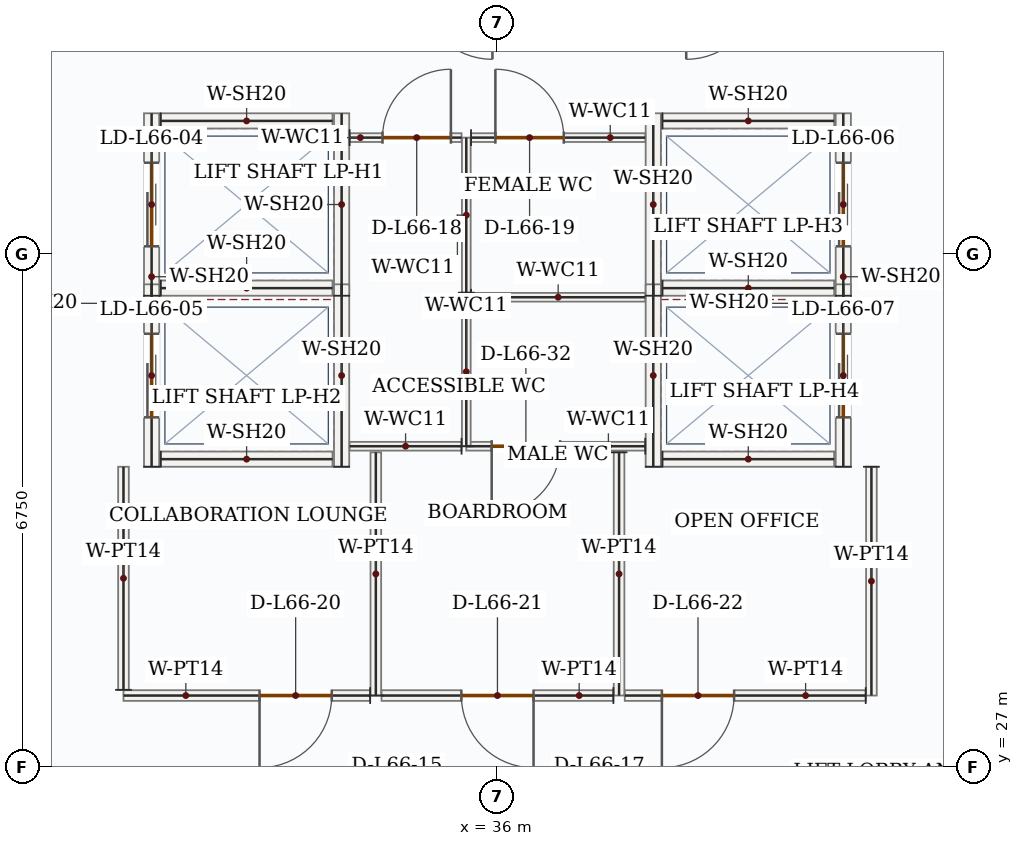
"""IFC4 building model, lengths in metres.
Left out: names, types, materials, properties, quantities, classifications, styles, units other than length and angle.
Written with IfcOpenShell. Run it as: python <this file> out.ifc"""

import sys

from ifc_helpers import new_model, si_unit, direction, frame, frame_2d, origin, place, context, subcontext, project, spatial, rectangle, extrude, source, transform, mapped, element, fill, save


model = new_model("IFC4")
c1 = context("Model", 3, precision=1e-05, world=origin(), true_north=direction((0.0, 1.0)))
c2 = subcontext(c1, "Body", "Model", "MODEL_VIEW")
j1 = project(units=[si_unit("LENGTHUNIT", "METRE"), si_unit("PLANEANGLEUNIT", "RADIAN")], contexts=[c1])
p1 = place(None, origin())
s1 = spatial("IfcSite", under=j1, at=p1, CompositionType="ELEMENT")
p2 = place(p1, origin())
s2 = spatial("IfcBuilding", under=s1, at=p2, CompositionType="ELEMENT")
p3 = place(p2, frame((0.0, 0.0, 276.6)))
s3 = spatial("IfcBuildingStorey", under=s2, at=p3, CompositionType="ELEMENT", Elevation=276.6)
p4 = place(p3, frame((31.45, 33.2, 0.0), z_axis=(0.0, 0.0, 1.0), x_axis=(0.0, 1.0, 0.0)))
e1 = element("IfcWall", 1, at=p4, inside=s3, PredefinedType="SOLIDWALL", context=c2, shape_type="SweptSolid", body=[
    extrude(rectangle(XDim=2.4, YDim=0.2, at=frame_2d((1.2, 0.0))), origin(), (0.0, 0.0, 1.0), 3.5),
])
p5 = place(p4, frame((0.65, 0.0, 0.0)))
e2 = element("IfcOpeningElement", 2, at=p5, cuts=e1, PredefinedType="OPENING", context=c2, shape_type="SweptSolid", body=[
    extrude(rectangle(XDim=1.1, YDim=2.15, at=frame_2d((0.55, 1.075))), frame((0.0, 0.11, 0.0), z_axis=(0.0, -1.0, 0.0), x_axis=(1.0, 0.0, 0.0)), (0.0, 0.0, 1.0), 0.22),
])
m1 = source(origin(), c2, "Body", "SweptSolid", [
    extrude(rectangle(XDim=2.4, YDim=0.2, at=frame_2d((1.2, 0.0))), origin(), (0.0, 0.0, 1.0), 3.5),
])
p6 = place(p3, frame((33.95, 33.2, 0.0), z_axis=(0.0, 0.0, 1.0), x_axis=(0.0, 1.0, 0.0)))
e3 = element("IfcWall", 3, at=p6, inside=s3, PredefinedType="SOLIDWALL", context=c2, shape_type="MappedRepresentation", body=[
    mapped(m1, transform((0.0, 0.0, 0.0), x_axis=(1.0, 0.0, 0.0), y_axis=(0.0, 1.0, 0.0), z_axis=(0.0, 0.0, 1.0), scale=1.0)),
])
m2 = source(origin(), c2, "Body", "SweptSolid", [
    extrude(rectangle(XDim=2.26, YDim=0.2, at=frame_2d((1.13, 0.0))), origin(), (0.0, 0.0, 1.0), 3.5),
])
for number, where, z_axis, x_axis in (
    (4, (31.57, 33.3, 0.0), (0.0, 0.0, 1.0), (1.0, 0.0, 0.0)),
    (5, (31.57, 35.5, 0.0), (0.0, 0.0, 1.0), (1.0, 0.0, 0.0)),
):
    element("IfcWall", number, at=place(p3, frame(where, z_axis=z_axis, x_axis=x_axis)), inside=s3, PredefinedType="SOLIDWALL", context=c2, shape_type="MappedRepresentation", body=[
        mapped(m2, transform((0.0, 0.0, 0.0), x_axis=(1.0, 0.0, 0.0), y_axis=(0.0, 1.0, 0.0), z_axis=(0.0, 0.0, 1.0), scale=1.0)),
    ])
p7 = place(p3, frame((31.45, 30.95, 0.0), z_axis=(0.0, 0.0, 1.0), x_axis=(0.0, 1.0, 0.0)))
e6 = element("IfcWall", 6, at=p7, inside=s3, PredefinedType="SOLIDWALL", context=c2, shape_type="SweptSolid", body=[
    extrude(rectangle(XDim=2.4, YDim=0.2, at=frame_2d((1.2, 0.0))), origin(), (0.0, 0.0, 1.0), 3.5),
])
p8 = place(p7, frame((0.65, 0.0, 0.0)))
e7 = element("IfcOpeningElement", 7, at=p8, cuts=e6, PredefinedType="OPENING", context=c2, shape_type="SweptSolid", body=[
    extrude(rectangle(XDim=1.1, YDim=2.15, at=frame_2d((0.55, 1.075))), frame((0.0, 0.11, 0.0), z_axis=(0.0, -1.0, 0.0), x_axis=(1.0, 0.0, 0.0)), (0.0, 0.0, 1.0), 0.22),
])
p9 = place(p3, frame((33.95, 30.95, 0.0), z_axis=(0.0, 0.0, 1.0), x_axis=(0.0, 1.0, 0.0)))
e8 = element("IfcWall", 8, at=p9, inside=s3, PredefinedType="SOLIDWALL", context=c2, shape_type="MappedRepresentation", body=[
    mapped(m1, transform((0.0, 0.0, 0.0), x_axis=(1.0, 0.0, 0.0), y_axis=(0.0, 1.0, 0.0), z_axis=(0.0, 0.0, 1.0), scale=1.0)),
])
p10 = place(p3, frame((31.57, 31.05, 0.0), z_axis=(0.0, 0.0, 1.0), x_axis=(1.0, 0.0, 0.0)))
e9 = element("IfcWall", 9, at=p10, inside=s3, PredefinedType="SOLIDWALL", context=c2, shape_type="MappedRepresentation", body=[
    mapped(m2, transform((0.0, 0.0, 0.0), x_axis=(1.0, 0.0, 0.0), y_axis=(0.0, 1.0, 0.0), z_axis=(0.0, 0.0, 1.0), scale=1.0)),
])
p11 = place(p3, frame((38.05, 33.2, 0.0), z_axis=(0.0, 0.0, 1.0), x_axis=(0.0, 1.0, 0.0)))
e10 = element("IfcWall", 10, at=p11, inside=s3, PredefinedType="SOLIDWALL", context=c2, shape_type="MappedRepresentation", body=[
    mapped(m1, transform((0.0, 0.0, 0.0), x_axis=(1.0, 0.0, 0.0), y_axis=(0.0, 1.0, 0.0), z_axis=(0.0, 0.0, 1.0), scale=1.0)),
])
p12 = place(p3, frame((40.55, 33.2, 0.0), z_axis=(0.0, 0.0, 1.0), x_axis=(0.0, 1.0, 0.0)))
e11 = element("IfcWall", 11, at=p12, inside=s3, PredefinedType="SOLIDWALL", context=c2, shape_type="SweptSolid", body=[
    extrude(rectangle(XDim=2.4, YDim=0.2, at=frame_2d((1.2, 0.0))), origin(), (0.0, 0.0, 1.0), 3.5),
])
p13 = place(p12, frame((0.65, 0.0, 0.0)))
e12 = element("IfcOpeningElement", 12, at=p13, cuts=e11, PredefinedType="OPENING", context=c2, shape_type="SweptSolid", body=[
    extrude(rectangle(XDim=1.1, YDim=2.15, at=frame_2d((0.55, 1.075))), frame((0.0, 0.11, 0.0), z_axis=(0.0, -1.0, 0.0), x_axis=(1.0, 0.0, 0.0)), (0.0, 0.0, 1.0), 0.22),
])
for number, where, z_axis, x_axis in (
    (13, (38.17, 33.3, 0.0), (0.0, 0.0, 1.0), (1.0, 0.0, 0.0)),
    (14, (38.17, 35.5, 0.0), (0.0, 0.0, 1.0), (1.0, 0.0, 0.0)),
):
    element("IfcWall", number, at=place(p3, frame(where, z_axis=z_axis, x_axis=x_axis)), inside=s3, PredefinedType="SOLIDWALL", context=c2, shape_type="MappedRepresentation", body=[
        mapped(m2, transform((0.0, 0.0, 0.0), x_axis=(1.0, 0.0, 0.0), y_axis=(0.0, 1.0, 0.0), z_axis=(0.0, 0.0, 1.0), scale=1.0)),
    ])
p14 = place(p3, frame((38.05, 30.95, 0.0), z_axis=(0.0, 0.0, 1.0), x_axis=(0.0, 1.0, 0.0)))
e15 = element("IfcWall", 15, at=p14, inside=s3, PredefinedType="SOLIDWALL", context=c2, shape_type="MappedRepresentation", body=[
    mapped(m1, transform((0.0, 0.0, 0.0), x_axis=(1.0, 0.0, 0.0), y_axis=(0.0, 1.0, 0.0), z_axis=(0.0, 0.0, 1.0), scale=1.0)),
])
p15 = place(p3, frame((40.55, 30.95, 0.0), z_axis=(0.0, 0.0, 1.0), x_axis=(0.0, 1.0, 0.0)))
e16 = element("IfcWall", 16, at=p15, inside=s3, PredefinedType="SOLIDWALL", context=c2, shape_type="SweptSolid", body=[
    extrude(rectangle(XDim=2.4, YDim=0.2, at=frame_2d((1.2, 0.0))), origin(), (0.0, 0.0, 1.0), 3.5),
])
p16 = place(p15, frame((0.65, 0.0, 0.0)))
e17 = element("IfcOpeningElement", 17, at=p16, cuts=e16, PredefinedType="OPENING", context=c2, shape_type="SweptSolid", body=[
    extrude(rectangle(XDim=1.1, YDim=2.15, at=frame_2d((0.55, 1.075))), frame((0.0, 0.11, 0.0), z_axis=(0.0, -1.0, 0.0), x_axis=(1.0, 0.0, 0.0)), (0.0, 0.0, 1.0), 0.22),
])
p17 = place(p3, frame((38.17, 31.05, 0.0), z_axis=(0.0, 0.0, 1.0), x_axis=(1.0, 0.0, 0.0)))
e18 = element("IfcWall", 18, at=p17, inside=s3, PredefinedType="SOLIDWALL", context=c2, shape_type="MappedRepresentation", body=[
    mapped(m2, transform((0.0, 0.0, 0.0), x_axis=(1.0, 0.0, 0.0), y_axis=(0.0, 1.0, 0.0), z_axis=(0.0, 0.0, 1.0), scale=1.0)),
])
p18 = place(p3, frame((37.945, 31.22, 0.0), z_axis=(0.0, 0.0, 1.0), x_axis=(-1.0, 0.0, 0.0)))
e19 = element("IfcWall", 19, at=p18, inside=s3, PredefinedType="PARTITIONING", context=c2, shape_type="SweptSolid", body=[
    extrude(rectangle(XDim=2.355, YDim=0.115, at=frame_2d((1.177, 0.0))), origin(), (0.0, 0.0, 1.0), 3.5),
])
p19 = place(p18, frame((1.121, 0.0, 0.0)))
e20 = element("IfcOpeningElement", 20, at=p19, cuts=e19, PredefinedType="OPENING", context=c2, shape_type="SweptSolid", body=[
    extrude(rectangle(XDim=0.9, YDim=2.1, at=frame_2d((0.45, 1.05))), frame((0.0, 0.067, 0.0), z_axis=(0.0, -1.0, 0.0), x_axis=(1.0, 0.0, 0.0)), (0.0, 0.0, 1.0), 0.135),
])
m3 = source(origin(), c2, "Body", "SweptSolid", [
    extrude(rectangle(XDim=1.96, YDim=0.115, at=frame_2d((0.98, 0.0))), origin(), (0.0, 0.0, 1.0), 3.5),
])
p20 = place(p3, frame((35.59, 31.22, 0.0), z_axis=(0.0, 0.0, 1.0), x_axis=(0.0, 1.0, 0.0)))
e21 = element("IfcWall", 21, at=p20, inside=s3, PredefinedType="PARTITIONING", context=c2, shape_type="MappedRepresentation", body=[
    mapped(m3, transform((0.0, 0.0, 0.0), x_axis=(1.0, 0.0, 0.0), y_axis=(0.0, 1.0, 0.0), z_axis=(0.0, 0.0, 1.0), scale=1.0)),
])
m4 = source(origin(), c2, "Body", "SweptSolid", [
    extrude(rectangle(XDim=2.292, YDim=0.115, at=frame_2d((1.146, 0.0))), origin(), (0.0, 0.0, 1.0), 3.5),
])
p21 = place(p3, frame((35.653, 33.18, 0.0), z_axis=(0.0, 0.0, 1.0), x_axis=(1.0, 0.0, 0.0)))
e22 = element("IfcWall", 22, at=p21, inside=s3, PredefinedType="PARTITIONING", context=c2, shape_type="MappedRepresentation", body=[
    mapped(m4, transform((0.0, 0.0, 0.0), x_axis=(1.0, 0.0, 0.0), y_axis=(0.0, 1.0, 0.0), z_axis=(0.0, 0.0, 1.0), scale=1.0)),
])
m5 = source(origin(), c2, "Body", "SweptSolid", [
    extrude(rectangle(XDim=2.04, YDim=0.115, at=frame_2d((1.02, 0.0))), origin(), (0.0, 0.0, 1.0), 3.5),
])
p22 = place(p3, frame((35.59, 33.24, 0.0), z_axis=(0.0, 0.0, 1.0), x_axis=(0.0, 1.0, 0.0)))
e23 = element("IfcWall", 23, at=p22, inside=s3, PredefinedType="PARTITIONING", context=c2, shape_type="MappedRepresentation", body=[
    mapped(m5, transform((0.0, 0.0, 0.0), x_axis=(1.0, 0.0, 0.0), y_axis=(0.0, 1.0, 0.0), z_axis=(0.0, 0.0, 1.0), scale=1.0)),
])
p23 = place(p3, frame((35.653, 35.28, 0.0), z_axis=(0.0, 0.0, 1.0), x_axis=(1.0, 0.0, 0.0)))
e24 = element("IfcWall", 24, at=p23, inside=s3, PredefinedType="PARTITIONING", context=c2, shape_type="SweptSolid", body=[
    extrude(rectangle(XDim=2.292, YDim=0.115, at=frame_2d((1.146, 0.0))), origin(), (0.0, 0.0, 1.0), 3.5),
])
p24 = place(p23, frame((0.32, 0.0, 0.0)))
e25 = element("IfcOpeningElement", 25, at=p24, cuts=e24, PredefinedType="OPENING", context=c2, shape_type="SweptSolid", body=[
    extrude(rectangle(XDim=0.9, YDim=2.1, at=frame_2d((0.45, 1.05))), frame((0.0, 0.067, 0.0), z_axis=(0.0, -1.0, 0.0), x_axis=(1.0, 0.0, 0.0)), (0.0, 0.0, 1.0), 0.135),
])
m6 = source(origin(), c2, "Body", "SweptSolid", [
    extrude(rectangle(XDim=1.473, YDim=0.115, at=frame_2d((0.736, 0.0))), origin(), (0.0, 0.0, 1.0), 3.5),
])
p25 = place(p3, frame((35.528, 31.22, 0.0), z_axis=(0.0, 0.0, 1.0), x_axis=(-1.0, 0.0, 0.0)))
e26 = element("IfcWall", 26, at=p25, inside=s3, PredefinedType="PARTITIONING", context=c2, shape_type="MappedRepresentation", body=[
    mapped(m6, transform((0.0, 0.0, 0.0), x_axis=(1.0, 0.0, 0.0), y_axis=(0.0, 1.0, 0.0), z_axis=(0.0, 0.0, 1.0), scale=1.0)),
])
p26 = place(p3, frame((34.055, 35.28, 0.0), z_axis=(0.0, 0.0, 1.0), x_axis=(1.0, 0.0, 0.0)))
e27 = element("IfcWall", 27, at=p26, inside=s3, PredefinedType="PARTITIONING", context=c2, shape_type="SweptSolid", body=[
    extrude(rectangle(XDim=1.473, YDim=0.115, at=frame_2d((0.736, 0.0))), origin(), (0.0, 0.0, 1.0), 3.5),
])
p27 = place(p26, frame((0.433, 0.0, 0.0)))
e28 = element("IfcOpeningElement", 28, at=p27, cuts=e27, PredefinedType="OPENING", context=c2, shape_type="SweptSolid", body=[
    extrude(rectangle(XDim=0.9, YDim=2.1, at=frame_2d((0.45, 1.05))), frame((0.0, 0.067, 0.0), z_axis=(0.0, -1.0, 0.0), x_axis=(1.0, 0.0, 0.0)), (0.0, 0.0, 1.0), 0.135),
])
m7 = source(origin(), c2, "Body", "SweptSolid", [
    extrude(rectangle(XDim=3.2, YDim=0.14, at=frame_2d((1.6, 0.0))), origin(), (0.0, 0.0, 1.0), 3.5),
])
for number, where, z_axis, x_axis in (
    (29, (34.4, 27.94, 0.0), (0.0, 0.0, 1.0), (0.0, 1.0, 0.0)),
    (30, (37.6, 31.14, 0.0), (0.0, 0.0, 1.0), (0.0, -1.0, 0.0)),
):
    element("IfcWall", number, at=place(p3, frame(where, z_axis=z_axis, x_axis=x_axis)), inside=s3, PredefinedType="PARTITIONING", context=c2, shape_type="MappedRepresentation", body=[
        mapped(m7, transform((0.0, 0.0, 0.0), x_axis=(1.0, 0.0, 0.0), y_axis=(0.0, 1.0, 0.0), z_axis=(0.0, 0.0, 1.0), scale=1.0)),
    ])
p28 = place(p3, frame((37.525, 27.94, 0.0), z_axis=(0.0, 0.0, 1.0), x_axis=(-1.0, 0.0, 0.0)))
e31 = element("IfcWall", 31, at=p28, inside=s3, PredefinedType="PARTITIONING", context=c2, shape_type="SweptSolid", body=[
    extrude(rectangle(XDim=3.05, YDim=0.14, at=frame_2d((1.525, 0.0))), origin(), (0.0, 0.0, 1.0), 3.5),
])
p29 = place(p28, frame((1.05, 0.0, 0.0)))
e32 = element("IfcOpeningElement", 32, at=p29, cuts=e31, PredefinedType="OPENING", context=c2, shape_type="SweptSolid", body=[
    extrude(rectangle(XDim=0.95, YDim=2.15, at=frame_2d((0.475, 1.075))), frame((0.0, 0.08, 0.0), z_axis=(0.0, -1.0, 0.0), x_axis=(1.0, 0.0, 0.0)), (0.0, 0.0, 1.0), 0.16),
])
p30 = place(p3, frame((34.325, 27.94, 0.0), z_axis=(0.0, 0.0, 1.0), x_axis=(-1.0, 0.0, 0.0)))
e33 = element("IfcWall", 33, at=p30, inside=s3, PredefinedType="PARTITIONING", context=c2, shape_type="SweptSolid", body=[
    extrude(rectangle(XDim=3.245, YDim=0.14, at=frame_2d((1.623, 0.0))), origin(), (0.0, 0.0, 1.0), 3.5),
])
p31 = place(p30, frame((0.505, 0.0, 0.0)))
e34 = element("IfcOpeningElement", 34, at=p31, cuts=e33, PredefinedType="OPENING", context=c2, shape_type="SweptSolid", body=[
    extrude(rectangle(XDim=0.95, YDim=2.15, at=frame_2d((0.475, 1.075))), frame((0.0, 0.08, 0.0), z_axis=(0.0, -1.0, 0.0), x_axis=(1.0, 0.0, 0.0)), (0.0, 0.0, 1.0), 0.16),
])
m8 = source(origin(), c2, "Body", "SweptSolid", [
    extrude(rectangle(XDim=2.935, YDim=0.14, at=frame_2d((1.468, 0.0))), origin(), (0.0, 0.0, 1.0), 3.5),
])
p32 = place(p3, frame((31.08, 28.015, 0.0), z_axis=(0.0, 0.0, 1.0), x_axis=(0.0, 1.0, 0.0)))
e35 = element("IfcWall", 35, at=p32, inside=s3, PredefinedType="PARTITIONING", context=c2, shape_type="MappedRepresentation", body=[
    mapped(m8, transform((0.0, 0.0, 0.0), x_axis=(1.0, 0.0, 0.0), y_axis=(0.0, 1.0, 0.0), z_axis=(0.0, 0.0, 1.0), scale=1.0)),
])
m9 = source(origin(), c2, "Body", "SweptSolid", [
    extrude(rectangle(XDim=3.01, YDim=0.14, at=frame_2d((1.505, 0.0))), origin(), (0.0, 0.0, 1.0), 3.5),
])
p33 = place(p3, frame((40.92, 30.95, 0.0), z_axis=(0.0, 0.0, 1.0), x_axis=(0.0, -1.0, 0.0)))
e36 = element("IfcWall", 36, at=p33, inside=s3, PredefinedType="PARTITIONING", context=c2, shape_type="MappedRepresentation", body=[
    mapped(m9, transform((0.0, 0.0, 0.0), x_axis=(1.0, 0.0, 0.0), y_axis=(0.0, 1.0, 0.0), z_axis=(0.0, 0.0, 1.0), scale=1.0)),
])
p34 = place(p3, frame((40.845, 27.94, 0.0), z_axis=(0.0, 0.0, 1.0), x_axis=(-1.0, 0.0, 0.0)))
e37 = element("IfcWall", 37, at=p34, inside=s3, PredefinedType="PARTITIONING", context=c2, shape_type="SweptSolid", body=[
    extrude(rectangle(XDim=3.17, YDim=0.14, at=frame_2d((1.585, 0.0))), origin(), (0.0, 0.0, 1.0), 3.5),
])
p35 = place(p34, frame((1.732, 0.0, 0.0)))
e38 = element("IfcOpeningElement", 38, at=p35, cuts=e37, PredefinedType="OPENING", context=c2, shape_type="SweptSolid", body=[
    extrude(rectangle(XDim=0.95, YDim=2.15, at=frame_2d((0.475, 1.075))), frame((0.0, 0.08, 0.0), z_axis=(0.0, -1.0, 0.0), x_axis=(1.0, 0.0, 0.0)), (0.0, 0.0, 1.0), 0.16),
])
m10 = source(origin(), c2, "Body", "SweptSolid", [
    extrude(rectangle(XDim=1.1, YDim=2.15, at=frame_2d((0.55, 1.075))), frame((0.0, 0.025, 0.0), z_axis=(0.0, -1.0, 0.0), x_axis=(1.0, 0.0, 0.0)), (0.0, 0.0, 1.0), 0.05),
])
p36 = place(p5, origin())
e39 = element("IfcDoor", 39, at=p36, inside=s3, OperationType="DOUBLE_DOOR_SLIDING", PredefinedType="DOOR", context=c2, shape_type="MappedRepresentation", body=[
    mapped(m10, transform((0.0, 0.0, 0.0), x_axis=(1.0, 0.0, 0.0), y_axis=(0.0, 1.0, 0.0), z_axis=(0.0, 0.0, 1.0), scale=1.0)),
])
fill(e2, e39)
p37 = place(p8, origin())
e40 = element("IfcDoor", 40, at=p37, inside=s3, OperationType="DOUBLE_DOOR_SLIDING", PredefinedType="DOOR", context=c2, shape_type="MappedRepresentation", body=[
    mapped(m10, transform((0.0, 0.0, 0.0), x_axis=(1.0, 0.0, 0.0), y_axis=(0.0, 1.0, 0.0), z_axis=(0.0, 0.0, 1.0), scale=1.0)),
])
fill(e7, e40)
p38 = place(p13, origin())
e41 = element("IfcDoor", 41, at=p38, inside=s3, OperationType="DOUBLE_DOOR_SLIDING", PredefinedType="DOOR", context=c2, shape_type="MappedRepresentation", body=[
    mapped(m10, transform((0.0, 0.0, 0.0), x_axis=(1.0, 0.0, 0.0), y_axis=(0.0, 1.0, 0.0), z_axis=(0.0, 0.0, 1.0), scale=1.0)),
])
fill(e12, e41)
p39 = place(p16, origin())
e42 = element("IfcDoor", 42, at=p39, inside=s3, OperationType="DOUBLE_DOOR_SLIDING", PredefinedType="DOOR", context=c2, shape_type="MappedRepresentation", body=[
    mapped(m10, transform((0.0, 0.0, 0.0), x_axis=(1.0, 0.0, 0.0), y_axis=(0.0, 1.0, 0.0), z_axis=(0.0, 0.0, 1.0), scale=1.0)),
])
fill(e17, e42)
m11 = source(origin(), c2, "Body", "SweptSolid", [
    extrude(rectangle(XDim=0.9, YDim=2.1, at=frame_2d((0.45, 1.05))), frame((0.0, 0.025, 0.0), z_axis=(0.0, -1.0, 0.0), x_axis=(1.0, 0.0, 0.0)), (0.0, 0.0, 1.0), 0.05),
])
p40 = place(p27, origin())
e43 = element("IfcDoor", 43, at=p40, inside=s3, OperationType="SINGLE_SWING_RIGHT", PredefinedType="DOOR", context=c2, shape_type="MappedRepresentation", body=[
    mapped(m11, transform((0.0, 0.0, 0.0), x_axis=(1.0, 0.0, 0.0), y_axis=(0.0, 1.0, 0.0), z_axis=(0.0, 0.0, 1.0), scale=1.0)),
])
fill(e28, e43)
p41 = place(p24, origin())
e44 = element("IfcDoor", 44, at=p41, inside=s3, OperationType="SINGLE_SWING_LEFT", PredefinedType="DOOR", context=c2, shape_type="MappedRepresentation", body=[
    mapped(m11, transform((0.0, 0.0, 0.0), x_axis=(1.0, 0.0, 0.0), y_axis=(0.0, 1.0, 0.0), z_axis=(0.0, 0.0, 1.0), scale=1.0)),
])
fill(e25, e44)
m12 = source(origin(), c2, "Body", "SweptSolid", [
    extrude(rectangle(XDim=0.95, YDim=2.15, at=frame_2d((0.475, 1.075))), frame((0.0, 0.025, 0.0), z_axis=(0.0, -1.0, 0.0), x_axis=(1.0, 0.0, 0.0)), (0.0, 0.0, 1.0), 0.05),
])
p42 = place(p31, origin())
e45 = element("IfcDoor", 45, at=p42, inside=s3, OperationType="SINGLE_SWING_RIGHT", PredefinedType="DOOR", context=c2, shape_type="MappedRepresentation", body=[
    mapped(m12, transform((0.0, 0.0, 0.0), x_axis=(1.0, 0.0, 0.0), y_axis=(0.0, 1.0, 0.0), z_axis=(0.0, 0.0, 1.0), scale=1.0)),
])
fill(e34, e45)
p43 = place(p29, origin())
e46 = element("IfcDoor", 46, at=p43, inside=s3, OperationType="SINGLE_SWING_LEFT", PredefinedType="DOOR", context=c2, shape_type="MappedRepresentation", body=[
    mapped(m12, transform((0.0, 0.0, 0.0), x_axis=(1.0, 0.0, 0.0), y_axis=(0.0, 1.0, 0.0), z_axis=(0.0, 0.0, 1.0), scale=1.0)),
])
fill(e32, e46)
p44 = place(p35, origin())
e47 = element("IfcDoor", 47, at=p44, inside=s3, OperationType="SINGLE_SWING_RIGHT", PredefinedType="DOOR", context=c2, shape_type="MappedRepresentation", body=[
    mapped(m12, transform((0.0, 0.0, 0.0), x_axis=(1.0, 0.0, 0.0), y_axis=(0.0, 1.0, 0.0), z_axis=(0.0, 0.0, 1.0), scale=1.0)),
])
fill(e38, e47)
p45 = place(p19, origin())
e48 = element("IfcDoor", 48, at=p45, inside=s3, OperationType="SINGLE_SWING_RIGHT", PredefinedType="DOOR", context=c2, shape_type="MappedRepresentation", body=[
    mapped(m11, transform((0.0, 0.0, 0.0), x_axis=(1.0, 0.0, 0.0), y_axis=(0.0, 1.0, 0.0), z_axis=(0.0, 0.0, 1.0), scale=1.0)),
])
fill(e20, e48)
save(model, sys.argv[1])
